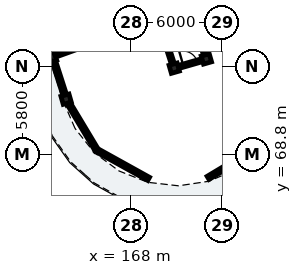
"""IFC4 building model, lengths in metres.
Left out: names, types, materials, properties, quantities, classifications, styles, units other than length and angle.
Written with IfcOpenShell. Run it as: python <this file> out.ifc"""

import sys

from ifc_helpers import new_model, si_unit, direction, frame, frame_2d, origin, origin_2d, place, context, subcontext, project, spatial, rectangle, extrude, element, fill, save


model = new_model("IFC4")
c1 = context("Model", 3, precision=1e-05, world=origin(), true_north=direction((0.0, 1.0)))
c2 = subcontext(c1, "Body", "Model", "MODEL_VIEW")
j1 = project(units=[si_unit("LENGTHUNIT", "METRE"), si_unit("PLANEANGLEUNIT", "RADIAN")], contexts=[c1])
p1 = place(None, origin())
s1 = spatial("IfcSite", under=j1, at=p1, CompositionType="ELEMENT")
p2 = place(p1, origin())
s2 = spatial("IfcBuilding", under=s1, at=p2, CompositionType="ELEMENT")
p3 = place(p2, frame((0.0, 0.0, 22.28)))
s3 = spatial("IfcBuildingStorey", under=s2, at=p3, CompositionType="ELEMENT", Elevation=22.28)
for number, where, z_axis, x_axis in (
    (1, (163.728, 72.452, 0.0), (0.0, 0.0, 1.0), (0.961, 0.276, 0.0)),
    (2, (170.841, 74.492, 0.0), (0.0, 0.0, 1.0), (0.961, 0.276, 0.0)),
    (3, (172.956, 75.098, 0.0), (0.0, 0.0, 1.0), (0.961, 0.276, 0.0)),
):
    element("IfcColumn", number, at=place(p3, frame(where, z_axis=z_axis, x_axis=x_axis)), inside=s3, PredefinedType="COLUMN", context=c2, shape_type="SweptSolid", body=[
        extrude(rectangle(XDim=0.55, YDim=0.55, at=origin_2d()), origin(), (0.0, 0.0, 1.0), 3.11),
    ])
p4 = place(p3, frame((162.828, 75.241, 0.0), z_axis=(0.0, 0.0, 1.0), x_axis=(0.941012076693, 0.338372976931, 0.0)))
e4 = element("IfcColumn", 4, at=p4, inside=s3, PredefinedType="PILASTER", context=c2, shape_type="SweptSolid", body=[
    extrude(rectangle(XDim=0.38, YDim=0.62, at=origin_2d()), origin(), (0.0, 0.0, 1.0), 3.11),
])
p5 = place(p3, frame((163.653, 72.685, 0.0), z_axis=(0.0, 0.0, 1.0), x_axis=(-0.30716379336, 0.951656662903, 0.0)))
e5 = element("IfcWall", 5, at=p5, inside=s3, PredefinedType="SOLIDWALL", context=c2, shape_type="SweptSolid", body=[
    extrude(rectangle(XDim=2.525, YDim=0.24, at=frame_2d((1.263, 0.0))), origin(), (0.0, 0.0, 1.0), 2.355),
])
p6 = place(p5, frame((0.523, 0.0, 0.55)))
e6 = element("IfcOpeningElement", 6, at=p6, cuts=e5, PredefinedType="OPENING", context=c2, shape_type="SweptSolid", body=[
    extrude(rectangle(XDim=1.48, YDim=1.62, at=frame_2d((0.74, 0.81))), frame((0.0, 0.13, 0.0), z_axis=(0.0, -1.0, 0.0), x_axis=(1.0, 0.0, 0.0)), (0.0, 0.0, 1.0), 0.26),
])
p7 = place(p3, frame((162.769, 75.389, 0.0), z_axis=(0.0, 0.0, 1.0), x_axis=(-0.369122600107, 0.92938071106, 0.0)))
e7 = element("IfcWall", 7, at=p7, inside=s3, PredefinedType="SOLIDWALL", context=c2, shape_type="SweptSolid", body=[
    extrude(rectangle(XDim=2.525, YDim=0.24, at=frame_2d((1.263, 0.0))), origin(), (0.0, 0.0, 1.0), 2.355),
])
p8 = place(p7, frame((0.663, 0.0, 0.55)))
e8 = element("IfcOpeningElement", 8, at=p8, cuts=e7, PredefinedType="OPENING", context=c2, shape_type="SweptSolid", body=[
    extrude(rectangle(XDim=1.2, YDim=1.51, at=frame_2d((0.6, 0.755))), frame((0.0, 0.13, 0.0), z_axis=(0.0, -1.0, 0.0), x_axis=(1.0, 0.0, 0.0)), (0.0, 0.0, 1.0), 0.26),
])
p9 = place(p3, frame((176.417, 69.289, 0.0), z_axis=(0.0, 0.0, 1.0), x_axis=(-0.85715098885, -0.515065221417, 0.0)))
e9 = element("IfcWall", 9, at=p9, inside=s3, PredefinedType="SOLIDWALL", context=c2, shape_type="SweptSolid", body=[
    extrude(rectangle(XDim=3.908, YDim=0.24, at=frame_2d((1.954, 0.0))), origin(), (0.0, 0.0, 1.0), 2.355),
])
p10 = place(p9, frame((1.029, 0.0, 0.4)))
e10 = element("IfcOpeningElement", 10, at=p10, cuts=e9, PredefinedType="OPENING", context=c2, shape_type="SweptSolid", body=[
    extrude(rectangle(XDim=1.85, YDim=1.72, at=frame_2d((0.925, 0.86))), frame((0.0, 0.13, 0.0), z_axis=(0.0, -1.0, 0.0), x_axis=(1.0, 0.0, 0.0)), (0.0, 0.0, 1.0), 0.26),
])
p11 = place(p3, frame((169.159, 67.208, 0.0), z_axis=(0.0, 0.0, 1.0), x_axis=(-0.874643043537, 0.484767517881, 0.0)))
e11 = element("IfcWall", 11, at=p11, inside=s3, PredefinedType="SOLIDWALL", context=c2, shape_type="SweptSolid", body=[
    extrude(rectangle(XDim=3.908, YDim=0.24, at=frame_2d((1.954, 0.0))), origin(), (0.0, 0.0, 1.0), 2.355),
])
p12 = place(p3, frame((165.741, 69.102, 0.0), z_axis=(0.0, 0.0, 1.0), x_axis=(-0.515037642827, 0.857167560324, 0.0)))
e12 = element("IfcWall", 12, at=p12, inside=s3, PredefinedType="SOLIDWALL", context=c2, shape_type="SweptSolid", body=[
    extrude(rectangle(XDim=3.908, YDim=0.24, at=frame_2d((1.954, 0.0))), origin(), (0.0, 0.0, 1.0), 2.355),
])
p13 = place(p12, frame((1.029, 0.0, 0.4)))
e13 = element("IfcOpeningElement", 13, at=p13, cuts=e12, PredefinedType="OPENING", context=c2, shape_type="SweptSolid", body=[
    extrude(rectangle(XDim=1.85, YDim=1.72, at=frame_2d((0.925, 0.86))), frame((0.0, 0.13, 0.0), z_axis=(0.0, -1.0, 0.0), x_axis=(1.0, 0.0, 0.0)), (0.0, 0.0, 1.0), 0.26),
])
p14 = place(p3, frame((172.849, 75.431, 0.0), z_axis=(0.0, 0.0, 1.0), x_axis=(-0.307157249761, 0.951658774939, 0.0)))
e14 = element("IfcWall", 14, at=p14, inside=s3, PredefinedType="PARTITIONING", context=c2, shape_type="SweptSolid", body=[
    extrude(rectangle(XDim=2.863, YDim=0.205, at=frame_2d((1.432, 0.0))), origin(), (0.0, 0.0, 1.0), 2.37),
])
p15 = place(p14, frame((0.967, 0.0, 0.0)))
e15 = element("IfcOpeningElement", 15, at=p15, cuts=e14, PredefinedType="OPENING", context=c2, shape_type="SweptSolid", body=[
    extrude(rectangle(XDim=0.93, YDim=2.12, at=frame_2d((0.465, 1.06))), frame((0.0, 0.113, 0.0), z_axis=(0.0, -1.0, 0.0), x_axis=(1.0, 0.0, 0.0)), (0.0, 0.0, 1.0), 0.225),
])
p16 = place(p3, frame((170.734, 74.825, 0.0), z_axis=(0.0, 0.0, 1.0), x_axis=(-0.307186478934, 0.95164934044, 0.0)))
e16 = element("IfcWall", 16, at=p16, inside=s3, PredefinedType="PARTITIONING", context=c2, shape_type="SweptSolid", body=[
    extrude(rectangle(XDim=2.718, YDim=0.205, at=frame_2d((1.359, 0.0))), origin(), (0.0, 0.0, 1.0), 2.37),
])
p17 = place(p16, frame((0.894, 0.0, 0.0)))
e17 = element("IfcOpeningElement", 17, at=p17, cuts=e16, PredefinedType="OPENING", context=c2, shape_type="SweptSolid", body=[
    extrude(rectangle(XDim=0.93, YDim=2.12, at=frame_2d((0.465, 1.06))), frame((0.0, 0.113, 0.0), z_axis=(0.0, -1.0, 0.0), x_axis=(1.0, 0.0, 0.0)), (0.0, 0.0, 1.0), 0.225),
])
p18 = place(p3, frame((163.204, 75.376, 0.0), z_axis=(0.0, 0.0, 1.0), x_axis=(0.941005714099, 0.338390670725, 0.0)))
e18 = element("IfcWall", 18, at=p18, inside=s3, PredefinedType="PARTITIONING", context=c2, shape_type="SweptSolid", body=[
    extrude(rectangle(XDim=6.6, YDim=0.185, at=frame_2d((3.3, 0.0))), origin(), (0.0, 0.0, 1.0), 2.37),
])
p19 = place(p3, frame((170.889, 74.506, 0.0), z_axis=(0.0, 0.0, 1.0), x_axis=(0.961264701934, 0.275626872449, 0.0)))
e19 = element("IfcWall", 19, at=p19, inside=s3, PredefinedType="PARTITIONING", context=c2, shape_type="SweptSolid", body=[
    extrude(rectangle(XDim=2.1, YDim=0.205, at=frame_2d((1.05, 0.0))), origin(), (0.0, 0.0, 1.0), 2.37),
])
p20 = place(p19, frame((0.57, 0.0, 0.0)))
e20 = element("IfcOpeningElement", 20, at=p20, cuts=e19, PredefinedType="OPENING", context=c2, shape_type="SweptSolid", body=[
    extrude(rectangle(XDim=0.95, YDim=2.13, at=frame_2d((0.475, 1.065))), frame((0.0, 0.113, 0.0), z_axis=(0.0, -1.0, 0.0), x_axis=(1.0, 0.0, 0.0)), (0.0, 0.0, 1.0), 0.225),
])
p21 = place(p6, origin())
e21 = element("IfcWindow", 21, at=p21, inside=s3, PartitioningType="SINGLE_PANEL", PredefinedType="WINDOW", context=c2, shape_type="SweptSolid", body=[
    extrude(rectangle(XDim=1.48, YDim=1.62, at=frame_2d((0.74, 0.81))), frame((0.0, 0.03, 0.0), z_axis=(0.0, -1.0, 0.0), x_axis=(1.0, 0.0, 0.0)), (0.0, 0.0, 1.0), 0.06),
])
fill(e6, e21)
p22 = place(p10, origin())
e22 = element("IfcWindow", 22, at=p22, inside=s3, PartitioningType="SINGLE_PANEL", PredefinedType="WINDOW", context=c2, shape_type="SweptSolid", body=[
    extrude(rectangle(XDim=1.85, YDim=1.72, at=frame_2d((0.925, 0.86))), frame((0.0, 0.03, 0.0), z_axis=(0.0, -1.0, 0.0), x_axis=(1.0, 0.0, 0.0)), (0.0, 0.0, 1.0), 0.06),
])
fill(e10, e22)
p23 = place(p13, origin())
e23 = element("IfcWindow", 23, at=p23, inside=s3, PartitioningType="SINGLE_PANEL", PredefinedType="WINDOW", context=c2, shape_type="SweptSolid", body=[
    extrude(rectangle(XDim=1.85, YDim=1.72, at=frame_2d((0.925, 0.86))), frame((0.0, 0.03, 0.0), z_axis=(0.0, -1.0, 0.0), x_axis=(1.0, 0.0, 0.0)), (0.0, 0.0, 1.0), 0.06),
])
fill(e13, e23)
p24 = place(p20, origin())
e24 = element("IfcDoor", 24, at=p24, inside=s3, OperationType="SINGLE_SWING_LEFT", PredefinedType="DOOR", context=c2, shape_type="SweptSolid", body=[
    extrude(rectangle(XDim=0.95, YDim=2.13, at=frame_2d((0.475, 1.065))), frame((0.0, 0.025, 0.0), z_axis=(0.0, -1.0, 0.0), x_axis=(1.0, 0.0, 0.0)), (0.0, 0.0, 1.0), 0.05),
])
fill(e20, e24)
save(model, sys.argv[1])
